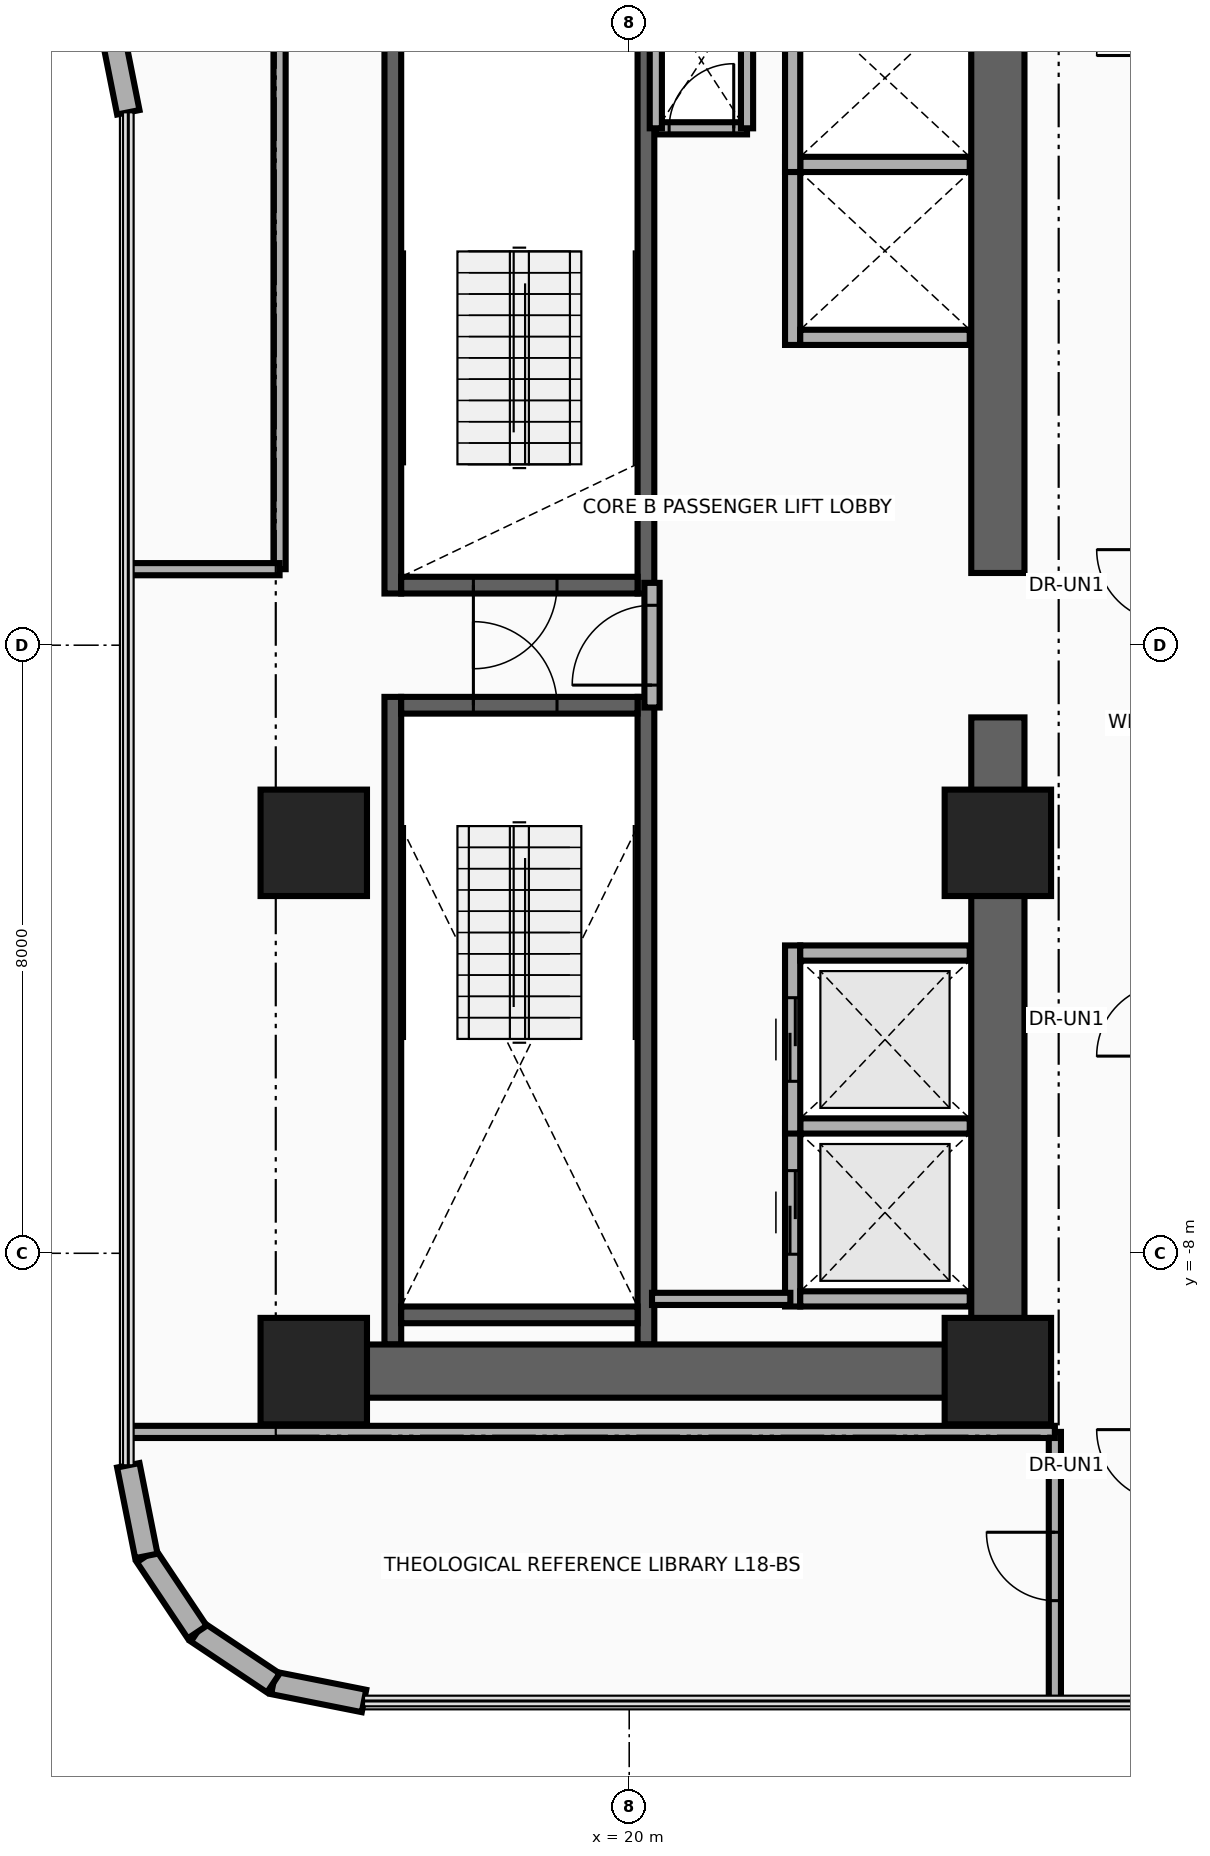
"""IFC4 building model, lengths in metres.
Left out: names, types, materials, properties, quantities, classifications, styles, units other than length and angle.
Written with IfcOpenShell. Run it as: python <this file> out.ifc"""

import sys

from ifc_helpers import new_model, si_unit, direction, frame, frame_2d, origin, origin_2d, place, context, subcontext, project, spatial, rectangle, extrude, source, transform, mapped, element, fill, save


model = new_model("IFC4")
c1 = context("Model", 3, precision=1e-05, world=origin(), true_north=direction((0.0, 1.0)))
c2 = subcontext(c1, "Body", "Model", "MODEL_VIEW")
j1 = project(units=[si_unit("LENGTHUNIT", "METRE"), si_unit("PLANEANGLEUNIT", "RADIAN")], contexts=[c1])
p1 = place(None, origin())
s1 = spatial("IfcSite", under=j1, at=p1, CompositionType="ELEMENT")
p2 = place(p1, origin())
s2 = spatial("IfcBuilding", under=s1, at=p2, CompositionType="ELEMENT")
p3 = place(p2, frame((0.0, 0.0, 74.1)))
s3 = spatial("IfcBuildingStorey", under=s2, at=p3, CompositionType="ELEMENT", Elevation=74.1)
for number, where, z_axis, x_axis in (
    (1, (16.89, 0.68, 0.0), (0.0, 0.0, 1.0), (0.0, 1.0, 0.0)),
    (2, (20.22, 0.68, 0.0), (0.0, 0.0, 1.0), (0.0, 1.0, 0.0)),
):
    element("IfcWall", number, at=place(p3, frame(where, z_axis=z_axis, x_axis=x_axis)), inside=s3, PredefinedType="SHEAR", context=c2, shape_type="SweptSolid", body=[
        extrude(rectangle(XDim=8.52, YDim=0.22, at=frame_2d((4.26, 0.0))), origin(), (0.0, 0.0, 1.0), 3.46),
    ])
p4 = place(p3, frame((17.0, 0.79, 0.0), z_axis=(0.0, 0.0, 1.0), x_axis=(1.0, 0.0, 0.0)))
e3 = element("IfcWall", 3, at=p4, inside=s3, PredefinedType="SHEAR", context=c2, shape_type="SweptSolid", body=[
    extrude(rectangle(XDim=3.11, YDim=0.22, at=frame_2d((1.555, 0.0))), origin(), (0.0, 0.0, 1.0), 3.46),
])
p5 = place(p4, frame((0.95, 0.0, 0.0)))
e4 = element("IfcOpeningElement", 4, at=p5, cuts=e3, PredefinedType="OPENING", context=c2, shape_type="SweptSolid", body=[
    extrude(rectangle(XDim=1.1, YDim=2.15, at=frame_2d((0.55, 1.075))), frame((0.0, 0.125, 0.0), z_axis=(0.0, -1.0, 0.0), x_axis=(1.0, 0.0, 0.0)), (0.0, 0.0, 1.0), 0.25),
])
for number, where, z_axis, x_axis in (
    (5, (16.89, -9.2, 0.0), (0.0, 0.0, 1.0), (0.0, 1.0, 0.0)),
    (6, (20.22, -9.2, 0.0), (0.0, 0.0, 1.0), (0.0, 1.0, 0.0)),
):
    element("IfcWall", number, at=place(p3, frame(where, z_axis=z_axis, x_axis=x_axis)), inside=s3, PredefinedType="SHEAR", context=c2, shape_type="SweptSolid", body=[
        extrude(rectangle(XDim=8.52, YDim=0.22, at=frame_2d((4.26, 0.0))), origin(), (0.0, 0.0, 1.0), 3.46),
    ])
p6 = place(p3, frame((17.0, -8.81, 0.0), z_axis=(0.0, 0.0, 1.0), x_axis=(1.0, 0.0, 0.0)))
e7 = element("IfcWall", 7, at=p6, inside=s3, PredefinedType="SHEAR", context=c2, shape_type="SweptSolid", body=[
    extrude(rectangle(XDim=3.11, YDim=0.22, at=frame_2d((1.555, 0.0))), origin(), (0.0, 0.0, 1.0), 3.46),
])
p7 = place(p3, frame((17.0, -0.79, 0.0), z_axis=(0.0, 0.0, 1.0), x_axis=(1.0, 0.0, 0.0)))
e8 = element("IfcWall", 8, at=p7, inside=s3, PredefinedType="SHEAR", context=c2, shape_type="SweptSolid", body=[
    extrude(rectangle(XDim=3.11, YDim=0.22, at=frame_2d((1.555, 0.0))), origin(), (0.0, 0.0, 1.0), 3.46),
])
p8 = place(p7, frame((0.95, 0.0, 0.0)))
e9 = element("IfcOpeningElement", 9, at=p8, cuts=e8, PredefinedType="OPENING", context=c2, shape_type="SweptSolid", body=[
    extrude(rectangle(XDim=1.1, YDim=2.15, at=frame_2d((0.55, 1.075))), frame((0.0, 0.125, 0.0), z_axis=(0.0, -1.0, 0.0), x_axis=(1.0, 0.0, 0.0)), (0.0, 0.0, 1.0), 0.25),
])
for number, where, z_axis, x_axis in (
    (10, (24.85, -9.9, 0.0), (0.0, 0.0, 1.0), (0.0, 1.0, 0.0)),
    (11, (24.85, 0.95, 0.0), (0.0, 0.0, 1.0), (0.0, 1.0, 0.0)),
):
    element("IfcWall", number, at=place(p3, frame(where, z_axis=z_axis, x_axis=x_axis)), inside=s3, PredefinedType="SHEAR", context=c2, shape_type="SweptSolid", body=[
        extrude(rectangle(XDim=8.95, YDim=0.7, at=frame_2d((4.475, 0.0))), origin(), (0.0, 0.0, 1.0), 3.46),
    ])
p9 = place(p3, frame((15.85, -9.55, 0.0), z_axis=(0.0, 0.0, 1.0), x_axis=(1.0, 0.0, 0.0)))
e12 = element("IfcWall", 12, at=p9, inside=s3, PredefinedType="SHEAR", context=c2, shape_type="SweptSolid", body=[
    extrude(rectangle(XDim=9.0, YDim=0.7, at=frame_2d((4.5, 0.0))), origin(), (0.0, 0.0, 1.0), 3.46),
])
m1 = source(origin(), c2, "Body", "SweptSolid", [
    extrude(rectangle(XDim=1.4, YDim=1.4, at=origin_2d()), origin(), (0.0, 0.0, 1.0), 3.7),
])
for number, where, z_axis, x_axis in (
    (13, (15.85, -9.55, 0.0), (0.0, 0.0, 1.0), (1.0, 0.0, 0.0)),
    (14, (24.85, -9.55, 0.0), (0.0, 0.0, 1.0), (1.0, 0.0, 0.0)),
    (15, (15.85, -2.6, 0.0), (0.0, 0.0, 1.0), (1.0, 0.0, 0.0)),
    (16, (24.85, -2.6, 0.0), (0.0, 0.0, 1.0), (1.0, 0.0, 0.0)),
):
    element("IfcColumn", number, at=place(p3, frame(where, z_axis=z_axis, x_axis=x_axis)), inside=s3, PredefinedType="COLUMN", context=c2, shape_type="MappedRepresentation", body=[
        mapped(m1, transform((0.0, 0.0, 0.0), x_axis=(1.0, 0.0, 0.0), y_axis=(0.0, 1.0, 0.0), z_axis=(0.0, 0.0, 1.0), scale=1.0)),
    ])
p10 = place(p3, frame((16.511, -13.89, 0.0), z_axis=(0.0, 0.0, 1.0), x_axis=(-0.980804027463, 0.194996050505, 0.0)))
e17 = element("IfcWall", 17, at=p10, inside=s3, PredefinedType="SOLIDWALL", context=c2, shape_type="SweptSolid", body=[
    extrude(rectangle(XDim=1.216, YDim=0.3, at=frame_2d((0.608, 0.0))), origin(), (0.0, 0.0, 1.0), 3.46),
])
for number, where, z_axis, x_axis in (
    (18, (15.318, -13.653, 0.0), (0.0, 0.0, 1.0), (-0.831, 0.556, 0.0)),
    (19, (14.317, -12.983, 0.0), (0.0, 0.0, 1.0), (-0.556, 0.831, 0.0)),
):
    element("IfcWall", number, at=place(p3, frame(where, z_axis=z_axis, x_axis=x_axis)), inside=s3, PredefinedType="SOLIDWALL", context=c2, shape_type="SweptSolid", body=[
        extrude(rectangle(XDim=1.205, YDim=0.3, at=frame_2d((0.603, 0.0))), origin(), (0.0, 0.0, 1.0), 3.46),
    ])
p11 = place(p3, frame((13.647, -11.982, 0.0), z_axis=(0.0, 0.0, 1.0), x_axis=(-0.195189223115, 0.980765602568, 0.0)))
e20 = element("IfcWall", 20, at=p11, inside=s3, PredefinedType="SOLIDWALL", context=c2, shape_type="SweptSolid", body=[
    extrude(rectangle(XDim=1.216, YDim=0.3, at=frame_2d((0.608, 0.0))), origin(), (0.0, 0.0, 1.0), 3.46),
])
p12 = place(p3, frame((13.41, 7.011, 0.0), z_axis=(0.0, 0.0, 1.0), x_axis=(-0.195090163074, 0.980785312019, 0.0)))
e21 = element("IfcWall", 21, at=p12, inside=s3, PredefinedType="SOLIDWALL", context=c2, shape_type="SweptSolid", body=[
    extrude(rectangle(XDim=1.281, YDim=0.3, at=frame_2d((0.641, 0.0))), origin(), (0.0, 0.0, 1.0), 3.46),
])
p13 = place(p3, frame((22.15, -8.7, 0.0), z_axis=(0.0, 0.0, 1.0), x_axis=(0.0, 1.0, 0.0)))
e22 = element("IfcWall", 22, at=p13, inside=s3, PredefinedType="MOVABLE", context=c2, shape_type="SweptSolid", body=[
    extrude(rectangle(XDim=2.475, YDim=0.2, at=frame_2d((1.237, 0.0))), origin(), (0.0, 0.0, 1.0), 3.46),
])
p14 = place(p13, frame((0.688, 0.0, 0.0)))
e23 = element("IfcOpeningElement", 23, at=p14, cuts=e22, PredefinedType="OPENING", context=c2, shape_type="SweptSolid", body=[
    extrude(rectangle(XDim=1.1, YDim=2.1, at=frame_2d((0.55, 1.05))), frame((0.0, 0.115, 0.0), z_axis=(0.0, -1.0, 0.0), x_axis=(1.0, 0.0, 0.0)), (0.0, 0.0, 1.0), 0.23),
])
for number, where, z_axis, x_axis in (
    (24, (22.25, -8.6, 0.0), (0.0, 0.0, 1.0), (1.0, 0.0, 0.0)),
    (25, (22.25, -6.325, 0.0), (0.0, 0.0, 1.0), (1.0, 0.0, 0.0)),
):
    element("IfcWall", number, at=place(p3, frame(where, z_axis=z_axis, x_axis=x_axis)), inside=s3, PredefinedType="MOVABLE", context=c2, shape_type="SweptSolid", body=[
        extrude(rectangle(XDim=2.23, YDim=0.2, at=frame_2d((1.115, 0.0))), origin(), (0.0, 0.0, 1.0), 3.46),
    ])
p15 = place(p3, frame((22.15, -6.425, 0.0), z_axis=(0.0, 0.0, 1.0), x_axis=(0.0, 1.0, 0.0)))
e26 = element("IfcWall", 26, at=p15, inside=s3, PredefinedType="MOVABLE", context=c2, shape_type="SweptSolid", body=[
    extrude(rectangle(XDim=2.475, YDim=0.2, at=frame_2d((1.238, 0.0))), origin(), (0.0, 0.0, 1.0), 3.46),
])
p16 = place(p15, frame((0.688, 0.0, 0.0)))
e27 = element("IfcOpeningElement", 27, at=p16, cuts=e26, PredefinedType="OPENING", context=c2, shape_type="SweptSolid", body=[
    extrude(rectangle(XDim=1.1, YDim=2.1, at=frame_2d((0.55, 1.05))), frame((0.0, 0.115, 0.0), z_axis=(0.0, -1.0, 0.0), x_axis=(1.0, 0.0, 0.0)), (0.0, 0.0, 1.0), 0.23),
])
p17 = place(p3, frame((22.25, -4.05, 0.0), z_axis=(0.0, 0.0, 1.0), x_axis=(1.0, 0.0, 0.0)))
e28 = element("IfcWall", 28, at=p17, inside=s3, PredefinedType="MOVABLE", context=c2, shape_type="SweptSolid", body=[
    extrude(rectangle(XDim=2.23, YDim=0.2, at=frame_2d((1.115, 0.0))), origin(), (0.0, 0.0, 1.0), 3.46),
])
p18 = place(p3, frame((22.15, 3.95, 0.0), z_axis=(0.0, 0.0, 1.0), x_axis=(0.0, 1.0, 0.0)))
e29 = element("IfcWall", 29, at=p18, inside=s3, PredefinedType="MOVABLE", context=c2, shape_type="SweptSolid", body=[
    extrude(rectangle(XDim=2.475, YDim=0.2, at=frame_2d((1.238, 0.0))), origin(), (0.0, 0.0, 1.0), 3.46),
])
for number, where, z_axis, x_axis in (
    (30, (22.25, 4.05, 0.0), (0.0, 0.0, 1.0), (1.0, 0.0, 0.0)),
    (31, (22.25, 6.325, 0.0), (0.0, 0.0, 1.0), (1.0, 0.0, 0.0)),
):
    element("IfcWall", number, at=place(p3, frame(where, z_axis=z_axis, x_axis=x_axis)), inside=s3, PredefinedType="MOVABLE", context=c2, shape_type="SweptSolid", body=[
        extrude(rectangle(XDim=2.23, YDim=0.2, at=frame_2d((1.115, 0.0))), origin(), (0.0, 0.0, 1.0), 2.245),
    ])
p19 = place(p3, frame((22.15, 6.225, 0.0), z_axis=(0.0, 0.0, 1.0), x_axis=(0.0, 1.0, 0.0)))
e32 = element("IfcWall", 32, at=p19, inside=s3, PredefinedType="MOVABLE", context=c2, shape_type="SweptSolid", body=[
    extrude(rectangle(XDim=2.475, YDim=0.2, at=frame_2d((1.237, 0.0))), origin(), (0.0, 0.0, 1.0), 3.46),
])
p20 = place(p3, frame((20.3, -0.82, 0.0), z_axis=(0.0, 0.0, 1.0), x_axis=(0.0, 1.0, 0.0)))
e33 = element("IfcWall", 33, at=p20, inside=s3, PredefinedType="PARTITIONING", context=c2, shape_type="SweptSolid", body=[
    extrude(rectangle(XDim=1.64, YDim=0.2, at=frame_2d((0.82, 0.0))), origin(), (0.0, 0.0, 1.0), 3.46),
])
p21 = place(p20, frame((0.295, 0.0, 0.0)))
e34 = element("IfcOpeningElement", 34, at=p21, cuts=e33, PredefinedType="OPENING", context=c2, shape_type="SweptSolid", body=[
    extrude(rectangle(XDim=1.05, YDim=2.15, at=frame_2d((0.525, 1.075))), frame((0.0, 0.115, 0.0), z_axis=(0.0, -1.0, 0.0), x_axis=(1.0, 0.0, 0.0)), (0.0, 0.0, 1.0), 0.23),
])
p22 = place(p3, frame((20.35, 6.8, 0.0), z_axis=(0.0, 0.0, 1.0), x_axis=(1.0, 0.0, 0.0)))
e35 = element("IfcWall", 35, at=p22, inside=s3, PredefinedType="PARTITIONING", context=c2, shape_type="SweptSolid", body=[
    extrude(rectangle(XDim=1.2, YDim=0.16, at=frame_2d((0.6, 0.0))), origin(), (0.0, 0.0, 1.0), 3.46),
])
p23 = place(p22, frame((0.175, 0.0, 0.0)))
e36 = element("IfcOpeningElement", 36, at=p23, cuts=e35, PredefinedType="OPENING", context=c2, shape_type="SweptSolid", body=[
    extrude(rectangle(XDim=0.85, YDim=2.05, at=frame_2d((0.425, 1.025))), frame((0.0, 0.095, 0.0), z_axis=(0.0, -1.0, 0.0), x_axis=(1.0, 0.0, 0.0)), (0.0, 0.0, 1.0), 0.19),
])
for number, where, z_axis, x_axis in (
    (37, (21.55, 6.8, 0.0), (0.0, 0.0, 1.0), (0.0, 1.0, 0.0)),
    (38, (20.35, 6.8, 0.0), (0.0, 0.0, 1.0), (0.0, 1.0, 0.0)),
):
    element("IfcWall", number, at=place(p3, frame(where, z_axis=z_axis, x_axis=x_axis)), inside=s3, PredefinedType="PARTITIONING", context=c2, shape_type="SweptSolid", body=[
        extrude(rectangle(XDim=1.8, YDim=0.16, at=frame_2d((0.9, 0.0))), origin(), (0.0, 0.0, 1.0), 3.46),
    ])
p24 = place(p3, frame((20.3, -8.6, 0.0), z_axis=(0.0, 0.0, 1.0), x_axis=(1.0, 0.0, 0.0)))
e39 = element("IfcWall", 39, at=p24, inside=s3, PredefinedType="PARTITIONING", context=c2, shape_type="SweptSolid", body=[
    extrude(rectangle(XDim=1.82, YDim=0.16, at=frame_2d((0.91, 0.0))), origin(), (0.0, 0.0, 1.0), 3.46),
])
p25 = place(p3, frame((25.6, -13.89, 0.0), z_axis=(0.0, 0.0, 1.0), x_axis=(0.0, 1.0, 0.0)))
e40 = element("IfcWall", 40, at=p25, inside=s3, PredefinedType="PARTITIONING", context=c2, shape_type="SweptSolid", body=[
    extrude(rectangle(XDim=3.54, YDim=0.16, at=frame_2d((1.77, 0.0))), origin(), (0.0, 0.0, 1.0), 3.46),
])
p26 = place(p25, frame((1.32, 0.0, 0.0)))
e41 = element("IfcOpeningElement", 41, at=p26, cuts=e40, PredefinedType="OPENING", context=c2, shape_type="SweptSolid", body=[
    extrude(rectangle(XDim=0.9, YDim=2.1, at=frame_2d((0.45, 1.05))), frame((0.0, 0.095, 0.0), z_axis=(0.0, -1.0, 0.0), x_axis=(1.0, 0.0, 0.0)), (0.0, 0.0, 1.0), 0.19),
])
p27 = place(p3, frame((13.41, -10.35, 0.0), z_axis=(0.0, 0.0, 1.0), x_axis=(1.0, 0.0, 0.0)))
e42 = element("IfcWall", 42, at=p27, inside=s3, PredefinedType="PARTITIONING", context=c2, shape_type="SweptSolid", body=[
    extrude(rectangle(XDim=12.19, YDim=0.16, at=frame_2d((6.095, 0.0))), origin(), (0.0, 0.0, 1.0), 3.46),
])
p28 = place(p3, frame((15.4, 1.0, 0.0), z_axis=(0.0, 0.0, 1.0), x_axis=(0.0, 1.0, 0.0)))
e43 = element("IfcWall", 43, at=p28, inside=s3, PredefinedType="PARTITIONING", context=c2, shape_type="SweptSolid", body=[
    extrude(rectangle(XDim=9.35, YDim=0.16, at=frame_2d((4.675, 0.0))), origin(), (0.0, 0.0, 1.0), 2.245),
])
p29 = place(p3, frame((13.41, 1.0, 0.0), z_axis=(0.0, 0.0, 1.0), x_axis=(1.0, 0.0, 0.0)))
e44 = element("IfcWall", 44, at=p29, inside=s3, PredefinedType="PARTITIONING", context=c2, shape_type="SweptSolid", body=[
    extrude(rectangle(XDim=1.99, YDim=0.16, at=frame_2d((0.995, 0.0))), origin(), (0.0, 0.0, 1.0), 2.245),
])
p30 = place(p14, origin())
e45 = element("IfcDoor", 45, at=p30, inside=s3, OperationType="DOUBLE_DOOR_SLIDING", PredefinedType="DOOR", context=c2, shape_type="SweptSolid", body=[
    extrude(rectangle(XDim=1.1, YDim=2.1, at=frame_2d((0.55, 1.05))), frame((0.0, 0.025, 0.0), z_axis=(0.0, -1.0, 0.0), x_axis=(1.0, 0.0, 0.0)), (0.0, 0.0, 1.0), 0.05),
])
fill(e23, e45)
p31 = place(p16, origin())
e46 = element("IfcDoor", 46, at=p31, inside=s3, OperationType="DOUBLE_DOOR_SLIDING", PredefinedType="DOOR", context=c2, shape_type="SweptSolid", body=[
    extrude(rectangle(XDim=1.1, YDim=2.1, at=frame_2d((0.55, 1.05))), frame((0.0, 0.025, 0.0), z_axis=(0.0, -1.0, 0.0), x_axis=(1.0, 0.0, 0.0)), (0.0, 0.0, 1.0), 0.05),
])
fill(e27, e46)
p32 = place(p21, origin())
e47 = element("IfcDoor", 47, at=p32, inside=s3, OperationType="SINGLE_SWING_RIGHT", PredefinedType="DOOR", context=c2, shape_type="SweptSolid", body=[
    extrude(rectangle(XDim=1.05, YDim=2.15, at=frame_2d((0.525, 1.075))), frame((0.0, 0.025, 0.0), z_axis=(0.0, -1.0, 0.0), x_axis=(1.0, 0.0, 0.0)), (0.0, 0.0, 1.0), 0.05),
])
fill(e34, e47)
p33 = place(p5, frame((1.1, 0.0, 0.0), z_axis=(0.0, 0.0, 1.0), x_axis=(-1.0, 0.0, 0.0)))
e48 = element("IfcDoor", 48, at=p33, inside=s3, OperationType="SINGLE_SWING_LEFT", PredefinedType="DOOR", context=c2, shape_type="SweptSolid", body=[
    extrude(rectangle(XDim=1.1, YDim=2.15, at=frame_2d((0.55, 1.075))), frame((0.0, 0.025, 0.0), z_axis=(0.0, -1.0, 0.0), x_axis=(1.0, 0.0, 0.0)), (0.0, 0.0, 1.0), 0.05),
])
fill(e4, e48)
p34 = place(p8, origin())
e49 = element("IfcDoor", 49, at=p34, inside=s3, OperationType="SINGLE_SWING_RIGHT", PredefinedType="DOOR", context=c2, shape_type="SweptSolid", body=[
    extrude(rectangle(XDim=1.1, YDim=2.15, at=frame_2d((0.55, 1.075))), frame((0.0, 0.025, 0.0), z_axis=(0.0, -1.0, 0.0), x_axis=(1.0, 0.0, 0.0)), (0.0, 0.0, 1.0), 0.05),
])
fill(e9, e49)
p35 = place(p23, origin())
e50 = element("IfcDoor", 50, at=p35, inside=s3, OperationType="SINGLE_SWING_LEFT", PredefinedType="DOOR", context=c2, shape_type="SweptSolid", body=[
    extrude(rectangle(XDim=0.85, YDim=2.05, at=frame_2d((0.425, 1.025))), frame((0.0, 0.025, 0.0), z_axis=(0.0, -1.0, 0.0), x_axis=(1.0, 0.0, 0.0)), (0.0, 0.0, 1.0), 0.05),
])
fill(e36, e50)
p36 = place(p26, origin())
e51 = element("IfcDoor", 51, at=p36, inside=s3, OperationType="SINGLE_SWING_RIGHT", PredefinedType="DOOR", context=c2, shape_type="SweptSolid", body=[
    extrude(rectangle(XDim=0.9, YDim=2.1, at=frame_2d((0.45, 1.05))), frame((0.0, 0.025, 0.0), z_axis=(0.0, -1.0, 0.0), x_axis=(1.0, 0.0, 0.0)), (0.0, 0.0, 1.0), 0.05),
])
fill(e41, e51)
save(model, sys.argv[1])
